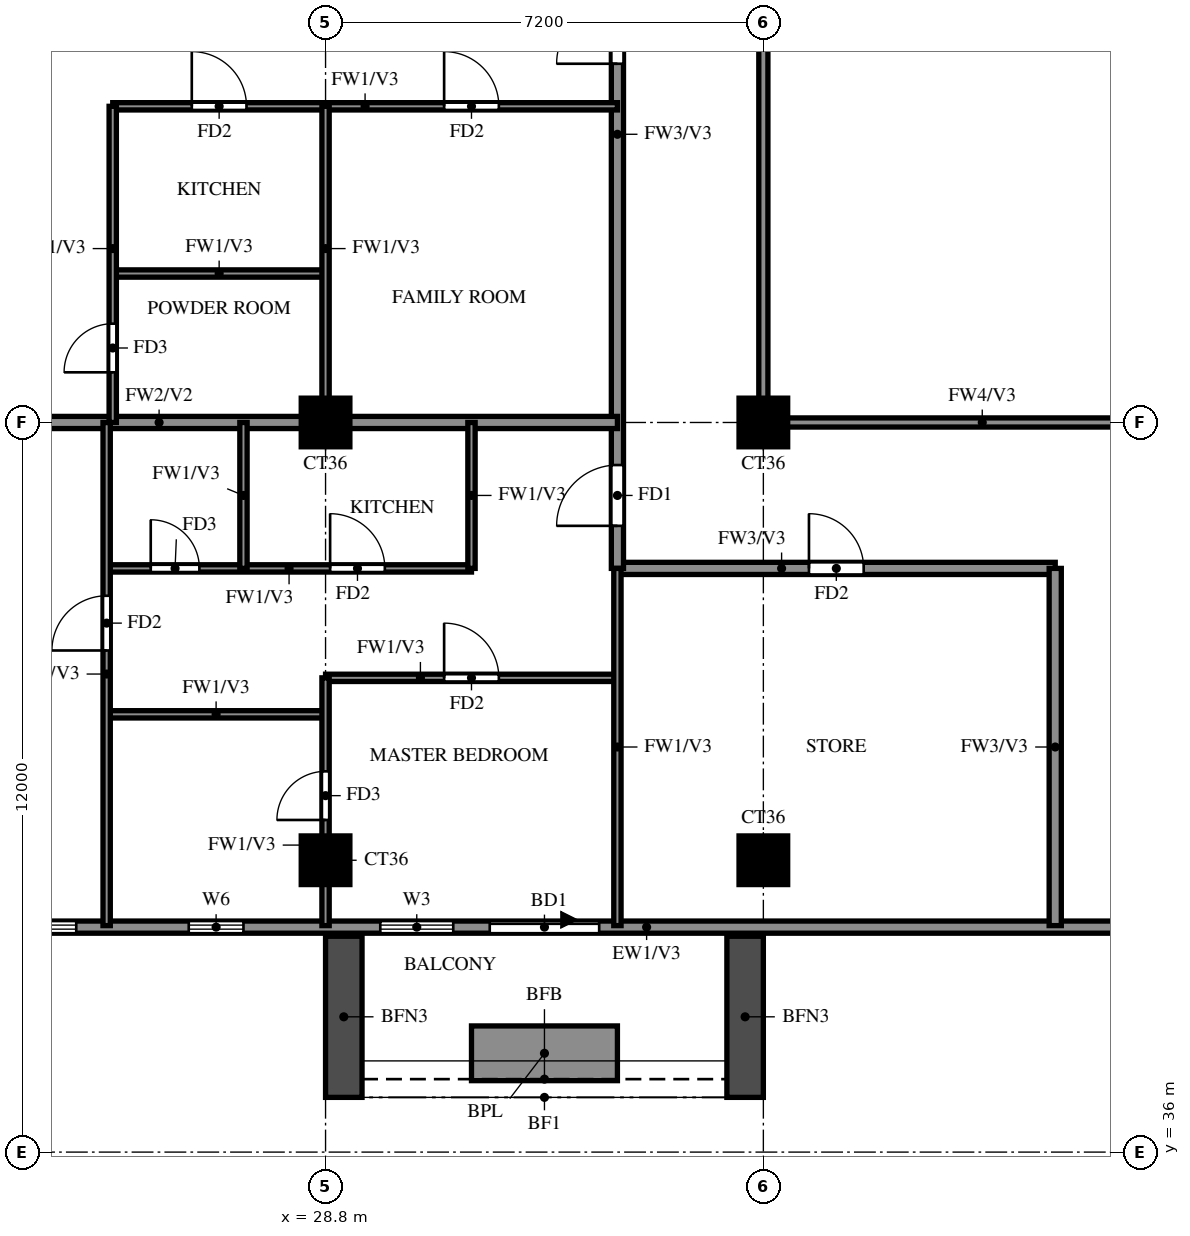
"""IFC4 building model, lengths in metres.
Left out: names, types, materials, properties, quantities, classifications, styles, units other than length and angle.
Written with IfcOpenShell. Run it as: python <this file> out.ifc"""

import sys

from ifc_helpers import new_model, si_unit, direction, frame, frame_2d, origin, origin_2d, place, context, subcontext, project, spatial, rectangle, extrude, source, transform, mapped, element, fill, save


model = new_model("IFC4")
c1 = context("Model", 3, precision=1e-05, world=origin(), true_north=direction((0.0, 1.0)))
c2 = subcontext(c1, "Body", "Model", "MODEL_VIEW")
j1 = project(units=[si_unit("LENGTHUNIT", "METRE"), si_unit("PLANEANGLEUNIT", "RADIAN")], contexts=[c1])
p1 = place(None, origin())
s1 = spatial("IfcSite", under=j1, at=p1, CompositionType="ELEMENT")
p2 = place(p1, origin())
s2 = spatial("IfcBuilding", under=s1, at=p2, CompositionType="ELEMENT")
p3 = place(p2, frame((0.0, 0.0, 243.0)))
s3 = spatial("IfcBuildingStorey", under=s2, at=p3, CompositionType="ELEMENT", Elevation=243.0)
m1 = source(origin(), c2, "Body", "SweptSolid", [
    extrude(rectangle(XDim=0.8, YDim=0.8, at=origin_2d()), origin(), (0.0, 0.0, 1.0), 3.22),
])
for number, where, z_axis, x_axis in (
    (1, (28.8, 40.8, 0.0), (0.0, 0.0, 1.0), (1.0, 0.0, 0.0)),
    (2, (36.0, 40.8, 0.0), (0.0, 0.0, 1.0), (1.0, 0.0, 0.0)),
    (3, (28.8, 48.0, 0.0), (0.0, 0.0, 1.0), (1.0, 0.0, 0.0)),
    (4, (36.0, 48.0, 0.0), (0.0, 0.0, 1.0), (1.0, 0.0, 0.0)),
):
    element("IfcColumn", number, at=place(p3, frame(where, z_axis=z_axis, x_axis=x_axis)), inside=s3, PredefinedType="COLUMN", context=c2, shape_type="MappedRepresentation", body=[
        mapped(m1, transform((0.0, 0.0, 0.0))),
    ])
p4 = place(p3, frame((22.2, 39.7, 0.0), z_axis=(0.0, 0.0, 1.0), x_axis=(1.0, 0.0, 0.0)))
e5 = element("IfcWall", 5, at=p4, inside=s3, PredefinedType="SOLIDWALL", context=c2, shape_type="SweptSolid", body=[
    extrude(rectangle(XDim=19.8, YDim=0.2, at=frame_2d((9.9, 0.0))), origin(), (0.0, 0.0, 1.0), 3.22),
])
p5 = place(p4, frame((9.3, 0.0, 0.0)))
e6 = element("IfcOpeningElement", 6, at=p5, cuts=e5, PredefinedType="OPENING", context=c2, shape_type="SweptSolid", body=[
    extrude(rectangle(XDim=1.8, YDim=2.4, at=frame_2d((0.9, 1.2))), frame((0.0, 0.11, 0.0), z_axis=(0.0, -1.0, 0.0), x_axis=(1.0, 0.0, 0.0)), (0.0, 0.0, 1.0), 0.22),
])
p6 = place(p4, frame((0.7, 0.0, 0.6)))
e7 = element("IfcOpeningElement", 7, at=p6, cuts=e5, PredefinedType="OPENING", context=c2, shape_type="SweptSolid", body=[
    extrude(rectangle(XDim=1.8, YDim=2.4, at=frame_2d((0.9, 1.2))), frame((0.0, 0.11, 0.0), z_axis=(0.0, -1.0, 0.0), x_axis=(1.0, 0.0, 0.0)), (0.0, 0.0, 1.0), 0.22),
])
p7 = place(p4, frame((7.5, 0.0, 0.6)))
e8 = element("IfcOpeningElement", 8, at=p7, cuts=e5, PredefinedType="OPENING", context=c2, shape_type="SweptSolid", body=[
    extrude(rectangle(XDim=1.2, YDim=2.4, at=frame_2d((0.6, 1.2))), frame((0.0, 0.11, 0.0), z_axis=(0.0, -1.0, 0.0), x_axis=(1.0, 0.0, 0.0)), (0.0, 0.0, 1.0), 0.22),
])
p8 = place(p4, frame((4.35, 0.0, 1.5)))
e9 = element("IfcOpeningElement", 9, at=p8, cuts=e5, PredefinedType="OPENING", context=c2, shape_type="SweptSolid", body=[
    extrude(rectangle(XDim=0.9, YDim=0.9, at=frame_2d((0.45, 0.45))), frame((0.0, 0.11, 0.0), z_axis=(0.0, -1.0, 0.0), x_axis=(1.0, 0.0, 0.0)), (0.0, 0.0, 1.0), 0.22),
])
for number, where, z_axis, x_axis in (
    (10, (29.1, 39.55, 0.0), (0.0, 0.0, 1.0), (0.0, -1.0, 0.0)),
    (11, (35.7, 39.55, 0.0), (0.0, 0.0, 1.0), (0.0, -1.0, 0.0)),
):
    element("IfcWall", number, at=place(p3, frame(where, z_axis=z_axis, x_axis=x_axis)), inside=s3, PredefinedType="SOLIDWALL", context=c2, shape_type="SweptSolid", body=[
        extrude(rectangle(XDim=2.65, YDim=0.6, at=frame_2d((1.325, 0.0))), origin(), (0.0, 0.0, 1.0), 2.85),
    ])
p9 = place(p3, frame((31.2, 37.625, 0.0), z_axis=(0.0, 0.0, 1.0), x_axis=(1.0, 0.0, 0.0)))
e12 = element("IfcWall", 12, at=p9, inside=s3, PredefinedType="SOLIDWALL", context=c2, shape_type="SweptSolid", body=[
    extrude(rectangle(XDim=2.4, YDim=0.9, at=frame_2d((1.2, 0.0))), origin(), (0.0, 0.0, 1.0), 0.9),
])
p10 = place(p3, frame((33.6, 45.6, 0.0), z_axis=(0.0, 0.0, 1.0), x_axis=(1.0, 0.0, 0.0)))
e13 = element("IfcWall", 13, at=p10, inside=s3, PredefinedType="SOLIDWALL", context=c2, shape_type="SweptSolid", body=[
    extrude(rectangle(XDim=7.2, YDim=0.2, at=frame_2d((3.6, 0.0))), origin(), (0.0, 0.0, 1.0), 3.22),
])
p11 = place(p10, frame((3.15, 0.0, 0.0)))
e14 = element("IfcOpeningElement", 14, at=p11, cuts=e13, PredefinedType="OPENING", context=c2, shape_type="SweptSolid", body=[
    extrude(rectangle(XDim=0.9, YDim=2.1, at=frame_2d((0.45, 1.05))), frame((0.0, 0.11, 0.0), z_axis=(0.0, -1.0, 0.0), x_axis=(1.0, 0.0, 0.0)), (0.0, 0.0, 1.0), 0.22),
])
p12 = place(p3, frame((33.6, 45.6, 0.0), z_axis=(0.0, 0.0, 1.0), x_axis=(0.0, 1.0, 0.0)))
e15 = element("IfcWall", 15, at=p12, inside=s3, PredefinedType="SOLIDWALL", context=c2, shape_type="SweptSolid", body=[
    extrude(rectangle(XDim=16.8, YDim=0.2, at=frame_2d((8.4, 0.0))), origin(), (0.0, 0.0, 1.0), 3.22),
])
p13 = place(p12, frame((0.7, 0.0, 0.0)))
e16 = element("IfcOpeningElement", 16, at=p13, cuts=e15, PredefinedType="OPENING", context=c2, shape_type="SweptSolid", body=[
    extrude(rectangle(XDim=1.0, YDim=2.1, at=frame_2d((0.5, 1.05))), frame((0.0, 0.11, 0.0), z_axis=(0.0, -1.0, 0.0), x_axis=(1.0, 0.0, 0.0)), (0.0, 0.0, 1.0), 0.22),
])
p14 = place(p12, frame((8.3, 0.0, 0.0)))
e17 = element("IfcOpeningElement", 17, at=p14, cuts=e15, PredefinedType="OPENING", context=c2, shape_type="SweptSolid", body=[
    extrude(rectangle(XDim=1.0, YDim=2.1, at=frame_2d((0.5, 1.05))), frame((0.0, 0.11, 0.0), z_axis=(0.0, -1.0, 0.0), x_axis=(1.0, 0.0, 0.0)), (0.0, 0.0, 1.0), 0.22),
])
p15 = place(p12, frame((15.1, 0.0, 0.0)))
e18 = element("IfcOpeningElement", 18, at=p15, cuts=e15, PredefinedType="OPENING", context=c2, shape_type="SweptSolid", body=[
    extrude(rectangle(XDim=1.0, YDim=2.1, at=frame_2d((0.5, 1.05))), frame((0.0, 0.11, 0.0), z_axis=(0.0, -1.0, 0.0), x_axis=(1.0, 0.0, 0.0)), (0.0, 0.0, 1.0), 0.22),
])
p16 = place(p3, frame((40.8, 39.725, 0.0), z_axis=(0.0, 0.0, 1.0), x_axis=(0.0, 1.0, 0.0)))
e19 = element("IfcWall", 19, at=p16, inside=s3, PredefinedType="SOLIDWALL", context=c2, shape_type="SweptSolid", body=[
    extrude(rectangle(XDim=5.875, YDim=0.2, at=frame_2d((2.938, 0.0))), origin(), (0.0, 0.0, 1.0), 3.22),
])
p17 = place(p3, frame((18.525, 48.0, 0.0), z_axis=(0.0, 0.0, 1.0), x_axis=(1.0, 0.0, 0.0)))
e20 = element("IfcWall", 20, at=p17, inside=s3, PredefinedType="SOLIDWALL", context=c2, shape_type="SweptSolid", body=[
    extrude(rectangle(XDim=15.075, YDim=0.2, at=frame_2d((7.538, 0.0))), origin(), (0.0, 0.0, 1.0), 3.22),
])
p18 = place(p3, frame((25.2, 43.2, 0.0), z_axis=(0.0, 0.0, 1.0), x_axis=(1.0, 0.0, 0.0)))
e21 = element("IfcWall", 21, at=p18, inside=s3, PredefinedType="PARTITIONING", context=c2, shape_type="SweptSolid", body=[
    extrude(rectangle(XDim=3.6, YDim=0.12, at=frame_2d((1.8, 0.0))), origin(), (0.0, 0.0, 1.0), 3.22),
])
p19 = place(p3, frame((28.8, 43.8, 0.0), z_axis=(0.0, 0.0, 1.0), x_axis=(1.0, 0.0, 0.0)))
e22 = element("IfcWall", 22, at=p19, inside=s3, PredefinedType="PARTITIONING", context=c2, shape_type="SweptSolid", body=[
    extrude(rectangle(XDim=4.8, YDim=0.12, at=frame_2d((2.4, 0.0))), origin(), (0.0, 0.0, 1.0), 3.22),
])
p20 = place(p19, frame((1.95, 0.0, 0.0)))
e23 = element("IfcOpeningElement", 23, at=p20, cuts=e22, PredefinedType="OPENING", context=c2, shape_type="SweptSolid", body=[
    extrude(rectangle(XDim=0.9, YDim=2.1, at=frame_2d((0.45, 1.05))), frame((0.0, 0.07, 0.0), z_axis=(0.0, -1.0, 0.0), x_axis=(1.0, 0.0, 0.0)), (0.0, 0.0, 1.0), 0.14),
])
p21 = place(p3, frame((25.2, 45.6, 0.0), z_axis=(0.0, 0.0, 1.0), x_axis=(1.0, 0.0, 0.0)))
e24 = element("IfcWall", 24, at=p21, inside=s3, PredefinedType="PARTITIONING", context=c2, shape_type="SweptSolid", body=[
    extrude(rectangle(XDim=6.0, YDim=0.12, at=frame_2d((3.0, 0.0))), origin(), (0.0, 0.0, 1.0), 3.22),
])
p22 = place(p21, frame((0.725, 0.0, 0.0)))
e25 = element("IfcOpeningElement", 25, at=p22, cuts=e24, PredefinedType="OPENING", context=c2, shape_type="SweptSolid", body=[
    extrude(rectangle(XDim=0.8, YDim=2.1, at=frame_2d((0.4, 1.05))), frame((0.0, 0.07, 0.0), z_axis=(0.0, -1.0, 0.0), x_axis=(1.0, 0.0, 0.0)), (0.0, 0.0, 1.0), 0.14),
])
p23 = place(p21, frame((3.675, 0.0, 0.0)))
e26 = element("IfcOpeningElement", 26, at=p23, cuts=e24, PredefinedType="OPENING", context=c2, shape_type="SweptSolid", body=[
    extrude(rectangle(XDim=0.9, YDim=2.1, at=frame_2d((0.45, 1.05))), frame((0.0, 0.07, 0.0), z_axis=(0.0, -1.0, 0.0), x_axis=(1.0, 0.0, 0.0)), (0.0, 0.0, 1.0), 0.14),
])
p24 = place(p3, frame((25.3, 50.45, 0.0), z_axis=(0.0, 0.0, 1.0), x_axis=(1.0, 0.0, 0.0)))
e27 = element("IfcWall", 27, at=p24, inside=s3, PredefinedType="PARTITIONING", context=c2, shape_type="SweptSolid", body=[
    extrude(rectangle(XDim=3.5, YDim=0.12, at=frame_2d((1.75, 0.0))), origin(), (0.0, 0.0, 1.0), 3.22),
])
p25 = place(p3, frame((25.3, 53.2, 0.0), z_axis=(0.0, 0.0, 1.0), x_axis=(1.0, 0.0, 0.0)))
e28 = element("IfcWall", 28, at=p25, inside=s3, PredefinedType="PARTITIONING", context=c2, shape_type="SweptSolid", body=[
    extrude(rectangle(XDim=8.3, YDim=0.12, at=frame_2d((4.15, 0.0))), origin(), (0.0, 0.0, 1.0), 3.22),
])
p26 = place(p25, frame((1.3, 0.0, 0.0)))
e29 = element("IfcOpeningElement", 29, at=p26, cuts=e28, PredefinedType="OPENING", context=c2, shape_type="SweptSolid", body=[
    extrude(rectangle(XDim=0.9, YDim=2.1, at=frame_2d((0.45, 1.05))), frame((0.0, 0.07, 0.0), z_axis=(0.0, -1.0, 0.0), x_axis=(1.0, 0.0, 0.0)), (0.0, 0.0, 1.0), 0.14),
])
p27 = place(p25, frame((5.45, 0.0, 0.0)))
e30 = element("IfcOpeningElement", 30, at=p27, cuts=e28, PredefinedType="OPENING", context=c2, shape_type="SweptSolid", body=[
    extrude(rectangle(XDim=0.9, YDim=2.1, at=frame_2d((0.45, 1.05))), frame((0.0, 0.07, 0.0), z_axis=(0.0, -1.0, 0.0), x_axis=(1.0, 0.0, 0.0)), (0.0, 0.0, 1.0), 0.14),
])
p28 = place(p3, frame((25.2, 39.725, 0.0), z_axis=(0.0, 0.0, 1.0), x_axis=(0.0, 1.0, 0.0)))
e31 = element("IfcWall", 31, at=p28, inside=s3, PredefinedType="PARTITIONING", context=c2, shape_type="SweptSolid", body=[
    extrude(rectangle(XDim=8.275, YDim=0.12, at=frame_2d((4.137, 0.0))), origin(), (0.0, 0.0, 1.0), 3.22),
])
p29 = place(p28, frame((4.525, 0.0, 0.0)))
e32 = element("IfcOpeningElement", 32, at=p29, cuts=e31, PredefinedType="OPENING", context=c2, shape_type="SweptSolid", body=[
    extrude(rectangle(XDim=0.9, YDim=2.1, at=frame_2d((0.45, 1.05))), frame((0.0, 0.07, 0.0), z_axis=(0.0, -1.0, 0.0), x_axis=(1.0, 0.0, 0.0)), (0.0, 0.0, 1.0), 0.14),
])
p30 = place(p3, frame((25.3, 48.0, 0.0), z_axis=(0.0, 0.0, 1.0), x_axis=(0.0, 1.0, 0.0)))
e33 = element("IfcWall", 33, at=p30, inside=s3, PredefinedType="PARTITIONING", context=c2, shape_type="SweptSolid", body=[
    extrude(rectangle(XDim=5.2, YDim=0.12, at=frame_2d((2.6, 0.0))), origin(), (0.0, 0.0, 1.0), 3.22),
])
p31 = place(p30, frame((0.825, 0.0, 0.0)))
e34 = element("IfcOpeningElement", 34, at=p31, cuts=e33, PredefinedType="OPENING", context=c2, shape_type="SweptSolid", body=[
    extrude(rectangle(XDim=0.8, YDim=2.1, at=frame_2d((0.4, 1.05))), frame((0.0, 0.07, 0.0), z_axis=(0.0, -1.0, 0.0), x_axis=(1.0, 0.0, 0.0)), (0.0, 0.0, 1.0), 0.14),
])
p32 = place(p3, frame((27.45, 45.6, 0.0), z_axis=(0.0, 0.0, 1.0), x_axis=(0.0, 1.0, 0.0)))
e35 = element("IfcWall", 35, at=p32, inside=s3, PredefinedType="PARTITIONING", context=c2, shape_type="SweptSolid", body=[
    extrude(rectangle(XDim=2.4, YDim=0.12, at=frame_2d((1.2, 0.0))), origin(), (0.0, 0.0, 1.0), 3.22),
])
p33 = place(p3, frame((28.8, 39.725, 0.0), z_axis=(0.0, 0.0, 1.0), x_axis=(0.0, 1.0, 0.0)))
e36 = element("IfcWall", 36, at=p33, inside=s3, PredefinedType="PARTITIONING", context=c2, shape_type="SweptSolid", body=[
    extrude(rectangle(XDim=4.075, YDim=0.12, at=frame_2d((2.038, 0.0))), origin(), (0.0, 0.0, 1.0), 3.22),
])
p34 = place(p33, frame((1.738, 0.0, 0.0)))
e37 = element("IfcOpeningElement", 37, at=p34, cuts=e36, PredefinedType="OPENING", context=c2, shape_type="SweptSolid", body=[
    extrude(rectangle(XDim=0.8, YDim=2.1, at=frame_2d((0.4, 1.05))), frame((0.0, 0.07, 0.0), z_axis=(0.0, -1.0, 0.0), x_axis=(1.0, 0.0, 0.0)), (0.0, 0.0, 1.0), 0.14),
])
p35 = place(p3, frame((28.8, 48.0, 0.0), z_axis=(0.0, 0.0, 1.0), x_axis=(0.0, 1.0, 0.0)))
e38 = element("IfcWall", 38, at=p35, inside=s3, PredefinedType="PARTITIONING", context=c2, shape_type="SweptSolid", body=[
    extrude(rectangle(XDim=5.2, YDim=0.12, at=frame_2d((2.6, 0.0))), origin(), (0.0, 0.0, 1.0), 3.22),
])
p36 = place(p3, frame((31.2, 45.6, 0.0), z_axis=(0.0, 0.0, 1.0), x_axis=(0.0, 1.0, 0.0)))
e39 = element("IfcWall", 39, at=p36, inside=s3, PredefinedType="PARTITIONING", context=c2, shape_type="SweptSolid", body=[
    extrude(rectangle(XDim=2.4, YDim=0.12, at=frame_2d((1.2, 0.0))), origin(), (0.0, 0.0, 1.0), 3.22),
])
p37 = place(p3, frame((33.6, 39.725, 0.0), z_axis=(0.0, 0.0, 1.0), x_axis=(0.0, 1.0, 0.0)))
e40 = element("IfcWall", 40, at=p37, inside=s3, PredefinedType="PARTITIONING", context=c2, shape_type="SweptSolid", body=[
    extrude(rectangle(XDim=5.875, YDim=0.12, at=frame_2d((2.938, 0.0))), origin(), (0.0, 0.0, 1.0), 3.22),
])
p38 = place(p3, frame((36.0, 48.0, 0.0), z_axis=(0.0, 0.0, 1.0), x_axis=(1.0, 0.0, 0.0)))
e41 = element("IfcWall", 41, at=p38, inside=s3, PredefinedType="SOLIDWALL", context=c2, shape_type="SweptSolid", body=[
    extrude(rectangle(XDim=7.2, YDim=0.15, at=frame_2d((3.6, 0.0))), origin(), (0.0, 0.0, 1.0), 2.32),
])
p39 = place(p3, frame((36.0, 48.0, 0.0), z_axis=(0.0, 0.0, 1.0), x_axis=(0.0, 1.0, 0.0)))
e42 = element("IfcWall", 42, at=p39, inside=s3, PredefinedType="SOLIDWALL", context=c2, shape_type="SweptSolid", body=[
    extrude(rectangle(XDim=14.4, YDim=0.15, at=frame_2d((7.2, 0.0))), origin(), (0.0, 0.0, 1.0), 2.32),
])
p40 = place(p5, origin())
e43 = element("IfcDoor", 43, at=p40, inside=s3, OperationType="DOUBLE_DOOR_SLIDING", PredefinedType="DOOR", context=c2, shape_type="SweptSolid", body=[
    extrude(rectangle(XDim=1.8, YDim=2.4, at=frame_2d((0.9, 1.2))), frame((0.0, 0.025, 0.0), z_axis=(0.0, -1.0, 0.0), x_axis=(1.0, 0.0, 0.0)), (0.0, 0.0, 1.0), 0.05),
])
fill(e6, e43)
p41 = place(p6, origin())
e44 = element("IfcWindow", 44, at=p41, inside=s3, PartitioningType="DOUBLE_PANEL_VERTICAL", PredefinedType="WINDOW", context=c2, shape_type="SweptSolid", body=[
    extrude(rectangle(XDim=1.8, YDim=2.4, at=frame_2d((0.9, 1.2))), frame((0.0, 0.03, 0.0), z_axis=(0.0, -1.0, 0.0), x_axis=(1.0, 0.0, 0.0)), (0.0, 0.0, 1.0), 0.06),
])
fill(e7, e44)
p42 = place(p7, origin())
e45 = element("IfcWindow", 45, at=p42, inside=s3, PartitioningType="SINGLE_PANEL", PredefinedType="WINDOW", context=c2, shape_type="SweptSolid", body=[
    extrude(rectangle(XDim=1.2, YDim=2.4, at=frame_2d((0.6, 1.2))), frame((0.0, 0.03, 0.0), z_axis=(0.0, -1.0, 0.0), x_axis=(1.0, 0.0, 0.0)), (0.0, 0.0, 1.0), 0.06),
])
fill(e8, e45)
p43 = place(p8, origin())
e46 = element("IfcWindow", 46, at=p43, inside=s3, PartitioningType="SINGLE_PANEL", PredefinedType="WINDOW", context=c2, shape_type="SweptSolid", body=[
    extrude(rectangle(XDim=0.9, YDim=0.9, at=frame_2d((0.45, 0.45))), frame((0.0, 0.03, 0.0), z_axis=(0.0, -1.0, 0.0), x_axis=(1.0, 0.0, 0.0)), (0.0, 0.0, 1.0), 0.06),
])
fill(e9, e46)
p44 = place(p13, origin())
e47 = element("IfcDoor", 47, at=p44, inside=s3, OperationType="SINGLE_SWING_LEFT", PredefinedType="DOOR", context=c2, shape_type="SweptSolid", body=[
    extrude(rectangle(XDim=1.0, YDim=2.1, at=frame_2d((0.5, 1.05))), frame((0.0, 0.025, 0.0), z_axis=(0.0, -1.0, 0.0), x_axis=(1.0, 0.0, 0.0)), (0.0, 0.0, 1.0), 0.05),
])
fill(e16, e47)
p45 = place(p29, origin())
e48 = element("IfcDoor", 48, at=p45, inside=s3, OperationType="SINGLE_SWING_RIGHT", PredefinedType="DOOR", context=c2, shape_type="SweptSolid", body=[
    extrude(rectangle(XDim=0.9, YDim=2.1, at=frame_2d((0.45, 1.05))), frame((0.0, 0.025, 0.0), z_axis=(0.0, -1.0, 0.0), x_axis=(1.0, 0.0, 0.0)), (0.0, 0.0, 1.0), 0.05),
])
fill(e32, e48)
p46 = place(p20, origin())
e49 = element("IfcDoor", 49, at=p46, inside=s3, OperationType="SINGLE_SWING_LEFT", PredefinedType="DOOR", context=c2, shape_type="SweptSolid", body=[
    extrude(rectangle(XDim=0.9, YDim=2.1, at=frame_2d((0.45, 1.05))), frame((0.0, 0.025, 0.0), z_axis=(0.0, -1.0, 0.0), x_axis=(1.0, 0.0, 0.0)), (0.0, 0.0, 1.0), 0.05),
])
fill(e23, e49)
p47 = place(p34, origin())
e50 = element("IfcDoor", 50, at=p47, inside=s3, OperationType="SINGLE_SWING_RIGHT", PredefinedType="DOOR", context=c2, shape_type="SweptSolid", body=[
    extrude(rectangle(XDim=0.8, YDim=2.1, at=frame_2d((0.4, 1.05))), frame((0.0, 0.025, 0.0), z_axis=(0.0, -1.0, 0.0), x_axis=(1.0, 0.0, 0.0)), (0.0, 0.0, 1.0), 0.05),
])
fill(e37, e50)
p48 = place(p22, origin())
e51 = element("IfcDoor", 51, at=p48, inside=s3, OperationType="SINGLE_SWING_RIGHT", PredefinedType="DOOR", context=c2, shape_type="SweptSolid", body=[
    extrude(rectangle(XDim=0.8, YDim=2.1, at=frame_2d((0.4, 1.05))), frame((0.0, 0.025, 0.0), z_axis=(0.0, -1.0, 0.0), x_axis=(1.0, 0.0, 0.0)), (0.0, 0.0, 1.0), 0.05),
])
fill(e25, e51)
p49 = place(p23, origin())
e52 = element("IfcDoor", 52, at=p49, inside=s3, OperationType="SINGLE_SWING_LEFT", PredefinedType="DOOR", context=c2, shape_type="SweptSolid", body=[
    extrude(rectangle(XDim=0.9, YDim=2.1, at=frame_2d((0.45, 1.05))), frame((0.0, 0.025, 0.0), z_axis=(0.0, -1.0, 0.0), x_axis=(1.0, 0.0, 0.0)), (0.0, 0.0, 1.0), 0.05),
])
fill(e26, e52)
p50 = place(p11, origin())
e53 = element("IfcDoor", 53, at=p50, inside=s3, OperationType="SINGLE_SWING_LEFT", PredefinedType="DOOR", context=c2, shape_type="SweptSolid", body=[
    extrude(rectangle(XDim=0.9, YDim=2.1, at=frame_2d((0.45, 1.05))), frame((0.0, 0.025, 0.0), z_axis=(0.0, -1.0, 0.0), x_axis=(1.0, 0.0, 0.0)), (0.0, 0.0, 1.0), 0.05),
])
fill(e14, e53)
p51 = place(p14, origin())
e54 = element("IfcDoor", 54, at=p51, inside=s3, OperationType="SINGLE_SWING_RIGHT", PredefinedType="DOOR", context=c2, shape_type="SweptSolid", body=[
    extrude(rectangle(XDim=1.0, YDim=2.1, at=frame_2d((0.5, 1.05))), frame((0.0, 0.025, 0.0), z_axis=(0.0, -1.0, 0.0), x_axis=(1.0, 0.0, 0.0)), (0.0, 0.0, 1.0), 0.05),
])
fill(e17, e54)
p52 = place(p31, origin())
e55 = element("IfcDoor", 55, at=p52, inside=s3, OperationType="SINGLE_SWING_LEFT", PredefinedType="DOOR", context=c2, shape_type="SweptSolid", body=[
    extrude(rectangle(XDim=0.8, YDim=2.1, at=frame_2d((0.4, 1.05))), frame((0.0, 0.025, 0.0), z_axis=(0.0, -1.0, 0.0), x_axis=(1.0, 0.0, 0.0)), (0.0, 0.0, 1.0), 0.05),
])
fill(e34, e55)
p53 = place(p26, origin())
e56 = element("IfcDoor", 56, at=p53, inside=s3, OperationType="SINGLE_SWING_LEFT", PredefinedType="DOOR", context=c2, shape_type="SweptSolid", body=[
    extrude(rectangle(XDim=0.9, YDim=2.1, at=frame_2d((0.45, 1.05))), frame((0.0, 0.025, 0.0), z_axis=(0.0, -1.0, 0.0), x_axis=(1.0, 0.0, 0.0)), (0.0, 0.0, 1.0), 0.05),
])
fill(e29, e56)
p54 = place(p27, origin())
e57 = element("IfcDoor", 57, at=p54, inside=s3, OperationType="SINGLE_SWING_LEFT", PredefinedType="DOOR", context=c2, shape_type="SweptSolid", body=[
    extrude(rectangle(XDim=0.9, YDim=2.1, at=frame_2d((0.45, 1.05))), frame((0.0, 0.025, 0.0), z_axis=(0.0, -1.0, 0.0), x_axis=(1.0, 0.0, 0.0)), (0.0, 0.0, 1.0), 0.05),
])
fill(e30, e57)
save(model, sys.argv[1])
